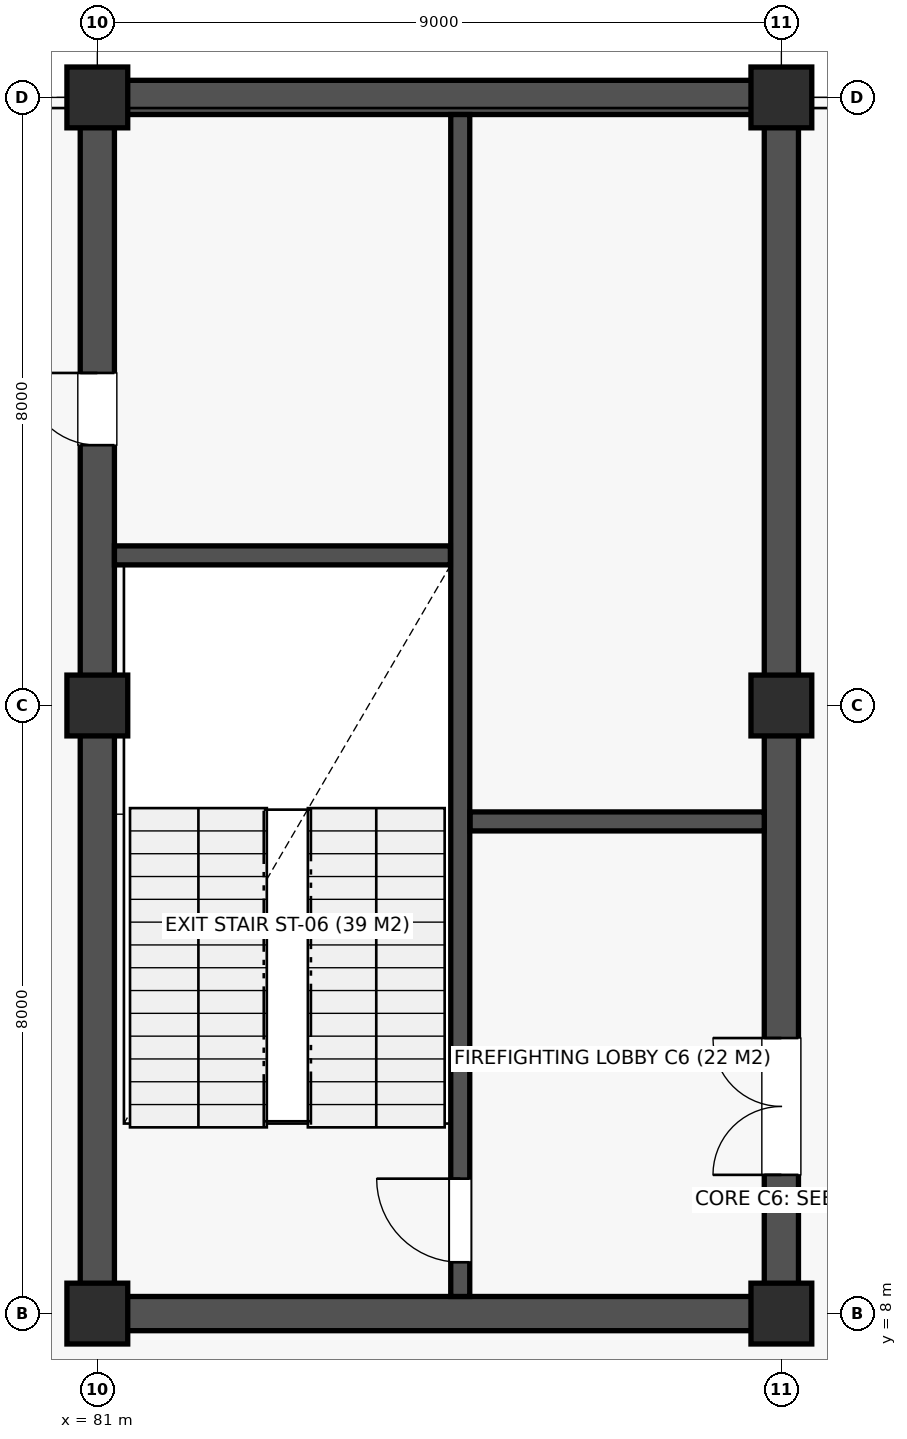
"""IFC4 building model, lengths in metres.
Left out: names, types, materials, properties, quantities, classifications, styles, units other than length and angle.
Written with IfcOpenShell. Run it as: python <this file> out.ifc"""

import sys

from ifc_helpers import new_model, si_unit, direction, frame, frame_2d, origin, origin_2d, place, context, subcontext, project, spatial, rectangle, extrude, element, fill, save


model = new_model("IFC4")
c1 = context("Model", 3, precision=1e-05, world=origin(), true_north=direction((0.0, 1.0)))
c2 = subcontext(c1, "Body", "Model", "MODEL_VIEW")
j1 = project(units=[si_unit("LENGTHUNIT", "METRE"), si_unit("PLANEANGLEUNIT", "RADIAN")], contexts=[c1])
p1 = place(None, origin())
s1 = spatial("IfcSite", under=j1, at=p1, CompositionType="ELEMENT")
p2 = place(p1, origin())
s2 = spatial("IfcBuilding", under=s1, at=p2, CompositionType="ELEMENT")
p3 = place(p2, frame((0.0, 0.0, 4.5)))
s3 = spatial("IfcBuildingStorey", under=s2, at=p3, CompositionType="ELEMENT", Elevation=4.5)
for number, where, z_axis, x_axis in (
    (1, (81.0, 8.0, 0.0), (0.0, 0.0, 1.0), (1.0, 0.0, 0.0)),
    (2, (81.0, 16.0, 0.0), (0.0, 0.0, 1.0), (1.0, 0.0, 0.0)),
    (3, (81.0, 24.0, 0.0), (0.0, 0.0, 1.0), (1.0, 0.0, 0.0)),
    (4, (90.0, 8.0, 0.0), (0.0, 0.0, 1.0), (1.0, 0.0, 0.0)),
    (5, (90.0, 16.0, 0.0), (0.0, 0.0, 1.0), (1.0, 0.0, 0.0)),
    (6, (90.0, 24.0, 0.0), (0.0, 0.0, 1.0), (1.0, 0.0, 0.0)),
):
    element("IfcColumn", number, at=place(p3, frame(where, z_axis=z_axis, x_axis=x_axis)), inside=s3, PredefinedType="COLUMN", context=c2, shape_type="SweptSolid", body=[
        extrude(rectangle(XDim=0.8, YDim=0.8, at=origin_2d()), origin(), (0.0, 0.0, 1.0), 4.5),
    ])
for number, where, z_axis, x_axis in (
    (7, (81.225, 8.0, 0.0), (0.0, 0.0, 1.0), (1.0, 0.0, 0.0)),
    (8, (81.225, 24.0, 0.0), (0.0, 0.0, 1.0), (1.0, 0.0, 0.0)),
):
    element("IfcWall", number, at=place(p3, frame(where, z_axis=z_axis, x_axis=x_axis)), inside=s3, PredefinedType="SHEAR", context=c2, shape_type="SweptSolid", body=[
        extrude(rectangle(XDim=8.55, YDim=0.45, at=frame_2d((4.275, 0.0))), origin(), (0.0, 0.0, 1.0), 4.18),
    ])
p4 = place(p3, frame((81.0, 8.225, 0.0), z_axis=(0.0, 0.0, 1.0), x_axis=(0.0, 1.0, 0.0)))
e9 = element("IfcWall", 9, at=p4, inside=s3, PredefinedType="SHEAR", context=c2, shape_type="SweptSolid", body=[
    extrude(rectangle(XDim=15.55, YDim=0.45, at=frame_2d((7.775, 0.0))), origin(), (0.0, 0.0, 1.0), 4.18),
])
p5 = place(p4, frame((11.2, 0.0, 0.0)))
e10 = element("IfcOpeningElement", 10, at=p5, cuts=e9, PredefinedType="OPENING", context=c2, shape_type="SweptSolid", body=[
    extrude(rectangle(XDim=0.95, YDim=2.1, at=frame_2d((0.475, 1.05))), frame((0.0, 0.237, 0.0), z_axis=(0.0, -1.0, 0.0), x_axis=(1.0, 0.0, 0.0)), (0.0, 0.0, 1.0), 0.474),
])
p6 = place(p3, frame((90.0, 8.225, 0.0), z_axis=(0.0, 0.0, 1.0), x_axis=(0.0, 1.0, 0.0)))
e11 = element("IfcWall", 11, at=p6, inside=s3, PredefinedType="SHEAR", context=c2, shape_type="SweptSolid", body=[
    extrude(rectangle(XDim=15.55, YDim=0.45, at=frame_2d((7.775, 0.0))), origin(), (0.0, 0.0, 1.0), 4.18),
])
p7 = place(p6, frame((1.6, 0.0, 0.0)))
e12 = element("IfcOpeningElement", 12, at=p7, cuts=e11, PredefinedType="OPENING", context=c2, shape_type="SweptSolid", body=[
    extrude(rectangle(XDim=1.8, YDim=2.18, at=frame_2d((0.9, 1.09))), frame((0.0, 0.237, 0.0), z_axis=(0.0, -1.0, 0.0), x_axis=(1.0, 0.0, 0.0)), (0.0, 0.0, 1.0), 0.474),
])
p8 = place(p3, frame((85.775, 8.225, 0.0), z_axis=(0.0, 0.0, 1.0), x_axis=(0.0, 1.0, 0.0)))
e13 = element("IfcWall", 13, at=p8, inside=s3, PredefinedType="SOLIDWALL", context=c2, shape_type="SweptSolid", body=[
    extrude(rectangle(XDim=15.55, YDim=0.25, at=frame_2d((7.775, 0.0))), origin(), (0.0, 0.0, 1.0), 4.18),
])
p9 = place(p8, frame((0.45, 0.0, 0.0)))
e14 = element("IfcOpeningElement", 14, at=p9, cuts=e13, PredefinedType="OPENING", context=c2, shape_type="SweptSolid", body=[
    extrude(rectangle(XDim=1.1, YDim=2.15, at=frame_2d((0.55, 1.075))), frame((0.0, 0.137, 0.0), z_axis=(0.0, -1.0, 0.0), x_axis=(1.0, 0.0, 0.0)), (0.0, 0.0, 1.0), 0.274),
])
p10 = place(p3, frame((81.225, 17.975, 0.0), z_axis=(0.0, 0.0, 1.0), x_axis=(1.0, 0.0, 0.0)))
e15 = element("IfcWall", 15, at=p10, inside=s3, PredefinedType="SOLIDWALL", context=c2, shape_type="SweptSolid", body=[
    extrude(rectangle(XDim=4.42, YDim=0.25, at=frame_2d((2.21, 0.0))), origin(), (0.0, 0.0, 1.0), 4.18),
])
p11 = place(p3, frame((85.905, 14.475, 0.0), z_axis=(0.0, 0.0, 1.0), x_axis=(1.0, 0.0, 0.0)))
e16 = element("IfcWall", 16, at=p11, inside=s3, PredefinedType="SOLIDWALL", context=c2, shape_type="SweptSolid", body=[
    extrude(rectangle(XDim=3.87, YDim=0.25, at=frame_2d((1.935, 0.0))), origin(), (0.0, 0.0, 1.0), 4.18),
])
p12 = place(p7, origin())
e17 = element("IfcDoor", 17, at=p12, inside=s3, OperationType="DOUBLE_DOOR_SINGLE_SWING", PredefinedType="DOOR", context=c2, shape_type="SweptSolid", body=[
    extrude(rectangle(XDim=1.8, YDim=2.18, at=frame_2d((0.9, 1.09))), frame((0.0, 0.025, 0.0), z_axis=(0.0, -1.0, 0.0), x_axis=(1.0, 0.0, 0.0)), (0.0, 0.0, 1.0), 0.05),
])
fill(e12, e17)
p13 = place(p9, origin())
e18 = element("IfcDoor", 18, at=p13, inside=s3, OperationType="SINGLE_SWING_RIGHT", PredefinedType="DOOR", context=c2, shape_type="SweptSolid", body=[
    extrude(rectangle(XDim=1.1, YDim=2.15, at=frame_2d((0.55, 1.075))), frame((0.0, 0.025, 0.0), z_axis=(0.0, -1.0, 0.0), x_axis=(1.0, 0.0, 0.0)), (0.0, 0.0, 1.0), 0.05),
])
fill(e14, e18)
p14 = place(p5, origin())
e19 = element("IfcDoor", 19, at=p14, inside=s3, OperationType="SINGLE_SWING_RIGHT", PredefinedType="DOOR", context=c2, shape_type="SweptSolid", body=[
    extrude(rectangle(XDim=0.95, YDim=2.1, at=frame_2d((0.475, 1.05))), frame((0.0, 0.025, 0.0), z_axis=(0.0, -1.0, 0.0), x_axis=(1.0, 0.0, 0.0)), (0.0, 0.0, 1.0), 0.05),
])
fill(e10, e19)
save(model, sys.argv[1])
